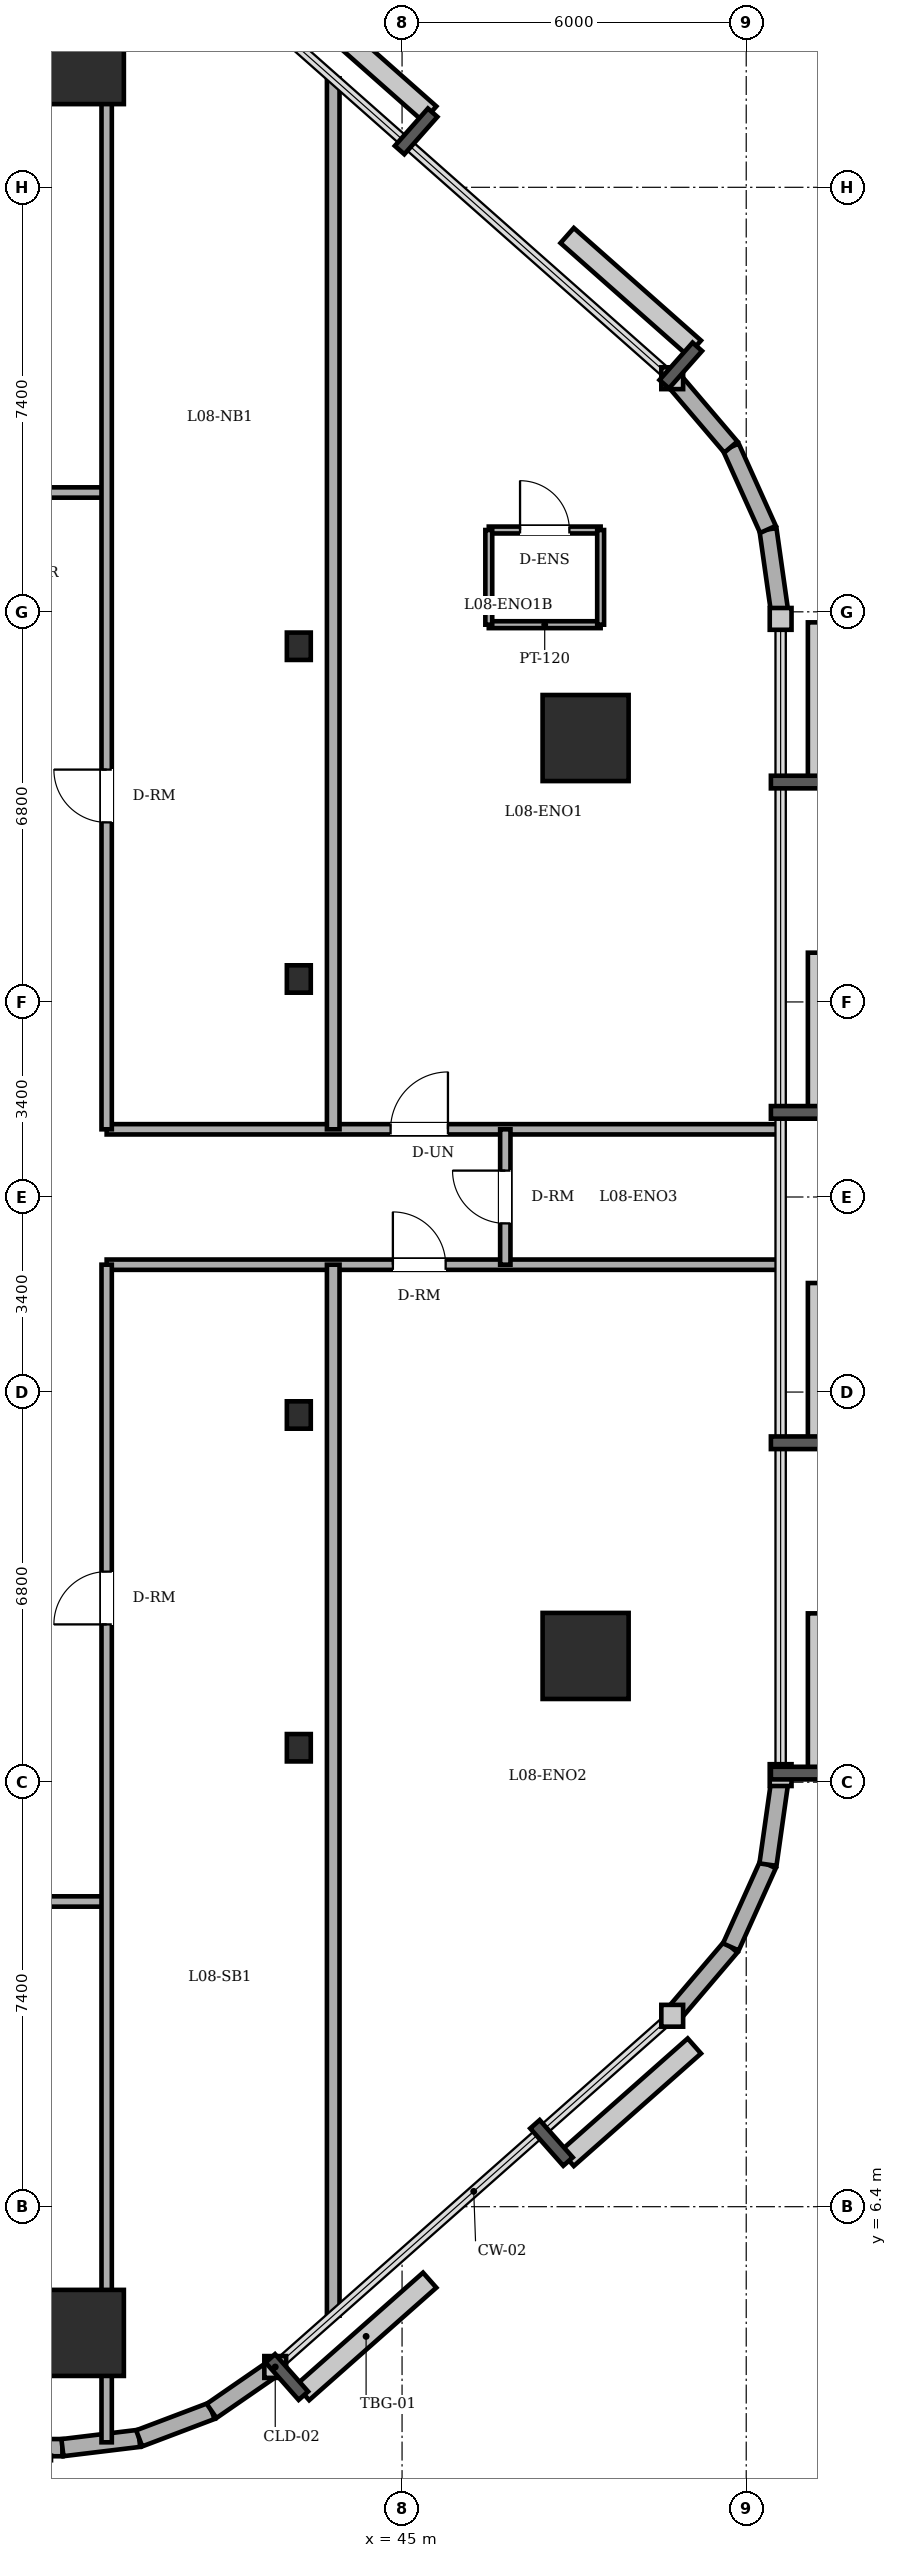
"""IFC4 building model, lengths in metres.
Left out: names, types, materials, properties, quantities, classifications, styles, units other than length and angle.
Written with IfcOpenShell. Run it as: python <this file> out.ifc"""

import sys

from ifc_helpers import new_model, si_unit, direction, frame, frame_2d, origin, origin_2d, place, context, subcontext, project, spatial, rectangle, circle, i_section, extrude, element, fill, save


model = new_model("IFC4")
c1 = context("Model", 3, precision=1e-05, world=origin(), true_north=direction((0.0, 1.0)))
c2 = subcontext(c1, "Body", "Model", "MODEL_VIEW")
j1 = project(units=[si_unit("LENGTHUNIT", "METRE"), si_unit("PLANEANGLEUNIT", "RADIAN")], contexts=[c1])
p1 = place(None, origin())
s1 = spatial("IfcSite", under=j1, at=p1, CompositionType="ELEMENT")
p2 = place(p1, origin())
s2 = spatial("IfcBuilding", under=s1, at=p2, CompositionType="ELEMENT")
p3 = place(p2, frame((0.0, 0.0, 32.4)))
s3 = spatial("IfcBuildingStorey", under=s2, at=p3, CompositionType="ELEMENT", Elevation=32.4)
for number, where, z_axis, x_axis in (
    (1, (39.4, 4.2, 0.0), (0.0, 0.0, 1.0), (1.0, 0.0, 0.0)),
    (2, (48.2, 16.0, 0.0), (0.0, 0.0, 1.0), (1.0, 0.0, 0.0)),
    (3, (48.2, 32.0, 0.0), (0.0, 0.0, 1.0), (1.0, 0.0, 0.0)),
    (4, (39.4, 43.8, 0.0), (0.0, 0.0, 1.0), (1.0, 0.0, 0.0)),
):
    element("IfcColumn", number, at=place(p3, frame(where, z_axis=z_axis, x_axis=x_axis)), inside=s3, PredefinedType="COLUMN", context=c2, shape_type="SweptSolid", body=[
        extrude(circle(Radius=0.75, at=origin_2d()), origin(), (0.0, 0.0, 1.0), 3.6),
    ])
for number, where, z_axis, x_axis in (
    (5, (43.2, 14.4, 0.0), (0.0, 0.0, 1.0), (1.0, 0.0, 0.0)),
    (6, (43.2, 20.2, 0.0), (0.0, 0.0, 1.0), (1.0, 0.0, 0.0)),
    (7, (43.2, 27.8, 0.0), (0.0, 0.0, 1.0), (1.0, 0.0, 0.0)),
    (8, (43.2, 33.6, 0.0), (0.0, 0.0, 1.0), (1.0, 0.0, 0.0)),
):
    element("IfcColumn", number, at=place(p3, frame(where, z_axis=z_axis, x_axis=x_axis)), inside=s3, PredefinedType="COLUMN", context=c2, shape_type="SweptSolid", body=[
        extrude(i_section(OverallWidth=0.417, OverallDepth=0.477, WebThickness=0.036, FlangeThickness=0.057, FilletRadius=0.015, at=origin_2d()), origin(), (0.0, 0.0, 1.0), 3.6),
    ])
p4 = place(p3, frame((9.0, 2.2, 0.0), z_axis=(0.0, 0.0, 1.0), x_axis=(1.0, 0.0, 0.0)))
e9 = element("IfcWall", 9, at=p4, inside=s3, PredefinedType="SOLIDWALL", context=c2, shape_type="SweptSolid", body=[
    extrude(rectangle(XDim=30.079, YDim=0.3, at=frame_2d((15.04, 0.0))), origin(), (0.0, 0.0, 1.0), 3.4),
])
p5 = place(p4, frame((5.412, 0.0, 0.0)))
e10 = element("IfcOpeningElement", 10, at=p5, cuts=e9, PredefinedType="OPENING", context=c2, shape_type="SweptSolid", body=[
    extrude(rectangle(XDim=0.95, YDim=2.2, at=frame_2d((0.475, 1.1))), frame((0.0, 0.16, 0.0), z_axis=(0.0, -1.0, 0.0), x_axis=(1.0, 0.0, 0.0)), (0.0, 0.0, 1.0), 0.32),
])
p6 = place(p4, frame((9.45, 0.0, 0.85)))
e11 = element("IfcOpeningElement", 11, at=p6, cuts=e9, PredefinedType="OPENING", context=c2, shape_type="SweptSolid", body=[
    extrude(rectangle(XDim=1.8, YDim=1.55, at=frame_2d((0.9, 0.775))), frame((0.0, 0.16, 0.0), z_axis=(0.0, -1.0, 0.0), x_axis=(1.0, 0.0, 0.0)), (0.0, 0.0, 1.0), 0.32),
])
p7 = place(p4, frame((15.2, 0.0, 0.85)))
e12 = element("IfcOpeningElement", 12, at=p7, cuts=e9, PredefinedType="OPENING", context=c2, shape_type="SweptSolid", body=[
    extrude(rectangle(XDim=1.8, YDim=1.55, at=frame_2d((0.9, 0.775))), frame((0.0, 0.16, 0.0), z_axis=(0.0, -1.0, 0.0), x_axis=(1.0, 0.0, 0.0)), (0.0, 0.0, 1.0), 0.32),
])
p8 = place(p4, frame((21.01, 0.0, 0.85)))
e13 = element("IfcOpeningElement", 13, at=p8, cuts=e9, PredefinedType="OPENING", context=c2, shape_type="SweptSolid", body=[
    extrude(rectangle(XDim=1.8, YDim=1.55, at=frame_2d((0.9, 0.775))), frame((0.0, 0.16, 0.0), z_axis=(0.0, -1.0, 0.0), x_axis=(1.0, 0.0, 0.0)), (0.0, 0.0, 1.0), 0.32),
])
p9 = place(p4, frame((24.919, 0.0, 0.85)))
e14 = element("IfcOpeningElement", 14, at=p9, cuts=e9, PredefinedType="OPENING", context=c2, shape_type="SweptSolid", body=[
    extrude(rectangle(XDim=1.8, YDim=1.55, at=frame_2d((0.9, 0.775))), frame((0.0, 0.16, 0.0), z_axis=(0.0, -1.0, 0.0), x_axis=(1.0, 0.0, 0.0)), (0.0, 0.0, 1.0), 0.32),
])
p10 = place(p3, frame((39.079, 2.2, 0.0), z_axis=(0.0, 0.0, 1.0), x_axis=(0.992739027259, 0.120288086515, 0.0)))
e15 = element("IfcWall", 15, at=p10, inside=s3, PredefinedType="SOLIDWALL", context=c2, shape_type="SweptSolid", body=[
    extrude(rectangle(XDim=1.348, YDim=0.3, at=frame_2d((0.674, 0.0))), origin(), (0.0, 0.0, 1.0), 3.4),
])
p11 = place(p3, frame((40.417, 2.362, 0.0), z_axis=(0.0, 0.0, 1.0), x_axis=(0.935156721165, 0.354234254216, 0.0)))
e16 = element("IfcWall", 16, at=p11, inside=s3, PredefinedType="SOLIDWALL", context=c2, shape_type="SweptSolid", body=[
    extrude(rectangle(XDim=1.349, YDim=0.3, at=frame_2d((0.675, 0.0))), origin(), (0.0, 0.0, 1.0), 3.4),
])
p12 = place(p3, frame((41.679, 2.84, 0.0), z_axis=(0.0, 0.0, 1.0), x_axis=(0.823116500192, 0.567872544777, 0.0)))
e17 = element("IfcWall", 17, at=p12, inside=s3, PredefinedType="SOLIDWALL", context=c2, shape_type="SweptSolid", body=[
    extrude(rectangle(XDim=1.349, YDim=0.3, at=frame_2d((0.674, 0.0))), origin(), (0.0, 0.0, 1.0), 3.4),
])
p13 = place(p3, frame((49.71, 9.728, 0.0), z_axis=(0.0, 0.0, 1.0), x_axis=(0.648389989909, 0.7613083613, 0.0)))
e18 = element("IfcWall", 18, at=p13, inside=s3, PredefinedType="SOLIDWALL", context=c2, shape_type="SweptSolid", body=[
    extrude(rectangle(XDim=1.576, YDim=0.3, at=frame_2d((0.788, 0.0))), origin(), (0.0, 0.0, 1.0), 3.4),
])
p14 = place(p3, frame((50.732, 10.928, 0.0), z_axis=(0.0, 0.0, 1.0), x_axis=(0.410996558744, 0.911636895206, 0.0)))
e19 = element("IfcWall", 19, at=p14, inside=s3, PredefinedType="SOLIDWALL", context=c2, shape_type="SweptSolid", body=[
    extrude(rectangle(XDim=1.574, YDim=0.3, at=frame_2d((0.787, 0.0))), origin(), (0.0, 0.0, 1.0), 3.4),
])
for number, where, z_axis, x_axis in (
    (20, (51.379, 12.363, 0.0), (0.0, 0.0, 1.0), (0.14, 0.99, 0.0)),
    (21, (51.6, 34.077, 0.0), (0.0, 0.0, 1.0), (-0.14, 0.99, 0.0)),
):
    element("IfcWall", number, at=place(p3, frame(where, z_axis=z_axis, x_axis=x_axis)), inside=s3, PredefinedType="SOLIDWALL", context=c2, shape_type="SweptSolid", body=[
        extrude(rectangle(XDim=1.576, YDim=0.3, at=frame_2d((0.788, 0.0))), origin(), (0.0, 0.0, 1.0), 3.4),
    ])
p15 = place(p3, frame((51.379, 35.637, 0.0), z_axis=(0.0, 0.0, 1.0), x_axis=(-0.410996558744, 0.911636895206, 0.0)))
e22 = element("IfcWall", 22, at=p15, inside=s3, PredefinedType="SOLIDWALL", context=c2, shape_type="SweptSolid", body=[
    extrude(rectangle(XDim=1.574, YDim=0.3, at=frame_2d((0.787, 0.0))), origin(), (0.0, 0.0, 1.0), 3.4),
])
p16 = place(p3, frame((50.732, 37.072, 0.0), z_axis=(0.0, 0.0, 1.0), x_axis=(-0.648389989909, 0.7613083613, 0.0)))
e23 = element("IfcWall", 23, at=p16, inside=s3, PredefinedType="SOLIDWALL", context=c2, shape_type="SweptSolid", body=[
    extrude(rectangle(XDim=1.576, YDim=0.3, at=frame_2d((0.788, 0.0))), origin(), (0.0, 0.0, 1.0), 3.4),
])
p17 = place(p3, frame((46.512, 35.626, 0.0), z_axis=(0.0, 0.0, 1.0), x_axis=(1.0, 0.0, 0.0)))
e24 = element("IfcWall", 24, at=p17, inside=s3, PredefinedType="PARTITIONING", context=c2, shape_type="SweptSolid", body=[
    extrude(rectangle(XDim=1.95, YDim=0.12, at=frame_2d((0.975, 0.0))), origin(), (0.0, 0.0, 1.0), 3.4),
])
p18 = place(p17, frame((0.545, 0.0, 0.0)))
e25 = element("IfcOpeningElement", 25, at=p18, cuts=e24, PredefinedType="OPENING", context=c2, shape_type="SweptSolid", body=[
    extrude(rectangle(XDim=0.86, YDim=2.1, at=frame_2d((0.43, 1.05))), frame((0.0, 0.07, 0.0), z_axis=(0.0, -1.0, 0.0), x_axis=(1.0, 0.0, 0.0)), (0.0, 0.0, 1.0), 0.14),
])
p19 = place(p3, frame((48.462, 33.976, 0.0), z_axis=(0.0, 0.0, 1.0), x_axis=(-1.0, 0.0, 0.0)))
e26 = element("IfcWall", 26, at=p19, inside=s3, PredefinedType="PARTITIONING", context=c2, shape_type="SweptSolid", body=[
    extrude(rectangle(XDim=1.95, YDim=0.12, at=frame_2d((0.975, 0.0))), origin(), (0.0, 0.0, 1.0), 3.4),
])
for number, where, z_axis, x_axis in (
    (27, (46.512, 35.626, 0.0), (0.0, 0.0, 1.0), (0.0, -1.0, 0.0)),
    (28, (48.462, 33.976, 0.0), (0.0, 0.0, 1.0), (0.0, 1.0, 0.0)),
):
    element("IfcWall", number, at=place(p3, frame(where, z_axis=z_axis, x_axis=x_axis)), inside=s3, PredefinedType="PARTITIONING", context=c2, shape_type="SweptSolid", body=[
        extrude(rectangle(XDim=1.65, YDim=0.12, at=frame_2d((0.825, 0.0))), origin(), (0.0, 0.0, 1.0), 3.4),
    ])
p20 = place(p3, frame((3.4, 11.72, 0.0), z_axis=(0.0, 0.0, 1.0), x_axis=(1.0, 0.0, 0.0)))
e29 = element("IfcWall", 29, at=p20, inside=s3, PredefinedType="PARTITIONING", context=c2, shape_type="SweptSolid", body=[
    extrude(rectangle(XDim=36.45, YDim=0.18, at=frame_2d((18.225, 0.0))), origin(), (0.0, 0.0, 1.0), 3.4),
])
p21 = place(p20, frame((21.24, 0.0, 0.0)))
e30 = element("IfcOpeningElement", 30, at=p21, cuts=e29, PredefinedType="OPENING", context=c2, shape_type="SweptSolid", body=[
    extrude(rectangle(XDim=0.92, YDim=2.1, at=frame_2d((0.46, 1.05))), frame((0.0, 0.1, 0.0), z_axis=(0.0, -1.0, 0.0), x_axis=(1.0, 0.0, 0.0)), (0.0, 0.0, 1.0), 0.2),
])
p22 = place(p20, frame((4.925, 0.0, 0.0)))
e31 = element("IfcOpeningElement", 31, at=p22, cuts=e29, PredefinedType="OPENING", context=c2, shape_type="SweptSolid", body=[
    extrude(rectangle(XDim=1.0, YDim=2.15, at=frame_2d((0.5, 1.075))), frame((0.0, 0.1, 0.0), z_axis=(0.0, -1.0, 0.0), x_axis=(1.0, 0.0, 0.0)), (0.0, 0.0, 1.0), 0.2),
])
p23 = place(p20, frame((13.525, 0.0, 0.0)))
e32 = element("IfcOpeningElement", 32, at=p23, cuts=e29, PredefinedType="OPENING", context=c2, shape_type="SweptSolid", body=[
    extrude(rectangle(XDim=1.0, YDim=2.15, at=frame_2d((0.5, 1.075))), frame((0.0, 0.1, 0.0), z_axis=(0.0, -1.0, 0.0), x_axis=(1.0, 0.0, 0.0)), (0.0, 0.0, 1.0), 0.2),
])
p24 = place(p20, frame((29.305, 0.0, 0.0)))
e33 = element("IfcOpeningElement", 33, at=p24, cuts=e29, PredefinedType="OPENING", context=c2, shape_type="SweptSolid", body=[
    extrude(rectangle(XDim=0.92, YDim=2.1, at=frame_2d((0.46, 1.05))), frame((0.0, 0.1, 0.0), z_axis=(0.0, -1.0, 0.0), x_axis=(1.0, 0.0, 0.0)), (0.0, 0.0, 1.0), 0.2),
])
p25 = place(p3, frame((39.85, 22.82, 0.0), z_axis=(0.0, 0.0, 1.0), x_axis=(1.0, 0.0, 0.0)))
e34 = element("IfcWall", 34, at=p25, inside=s3, PredefinedType="PARTITIONING", context=c2, shape_type="SweptSolid", body=[
    extrude(rectangle(XDim=11.75, YDim=0.18, at=frame_2d((5.875, 0.0))), origin(), (0.0, 0.0, 1.0), 3.4),
])
p26 = place(p25, frame((4.99, 0.0, 0.0)))
e35 = element("IfcOpeningElement", 35, at=p26, cuts=e34, PredefinedType="OPENING", context=c2, shape_type="SweptSolid", body=[
    extrude(rectangle(XDim=0.92, YDim=2.1, at=frame_2d((0.46, 1.05))), frame((0.0, 0.1, 0.0), z_axis=(0.0, -1.0, 0.0), x_axis=(1.0, 0.0, 0.0)), (0.0, 0.0, 1.0), 0.2),
])
p27 = place(p3, frame((39.85, 25.18, 0.0), z_axis=(0.0, 0.0, 1.0), x_axis=(1.0, 0.0, 0.0)))
e36 = element("IfcWall", 36, at=p27, inside=s3, PredefinedType="PARTITIONING", context=c2, shape_type="SweptSolid", body=[
    extrude(rectangle(XDim=11.75, YDim=0.18, at=frame_2d((5.875, 0.0))), origin(), (0.0, 0.0, 1.0), 3.4),
])
p28 = place(p27, frame((4.95, 0.0, 0.0)))
e37 = element("IfcOpeningElement", 37, at=p28, cuts=e36, PredefinedType="OPENING", context=c2, shape_type="SweptSolid", body=[
    extrude(rectangle(XDim=1.0, YDim=2.15, at=frame_2d((0.5, 1.075))), frame((0.0, 0.1, 0.0), z_axis=(0.0, -1.0, 0.0), x_axis=(1.0, 0.0, 0.0)), (0.0, 0.0, 1.0), 0.2),
])
p29 = place(p3, frame((3.4, 36.28, 0.0), z_axis=(0.0, 0.0, 1.0), x_axis=(1.0, 0.0, 0.0)))
e38 = element("IfcWall", 38, at=p29, inside=s3, PredefinedType="PARTITIONING", context=c2, shape_type="SweptSolid", body=[
    extrude(rectangle(XDim=36.45, YDim=0.18, at=frame_2d((18.225, 0.0))), origin(), (0.0, 0.0, 1.0), 3.4),
])
p30 = place(p29, frame((21.05, 0.0, 0.0)))
e39 = element("IfcOpeningElement", 39, at=p30, cuts=e38, PredefinedType="OPENING", context=c2, shape_type="SweptSolid", body=[
    extrude(rectangle(XDim=0.9, YDim=2.1, at=frame_2d((0.45, 1.05))), frame((0.0, 0.1, 0.0), z_axis=(0.0, -1.0, 0.0), x_axis=(1.0, 0.0, 0.0)), (0.0, 0.0, 1.0), 0.2),
])
p31 = place(p29, frame((24.67, 0.0, 0.0)))
e40 = element("IfcOpeningElement", 40, at=p31, cuts=e38, PredefinedType="OPENING", context=c2, shape_type="SweptSolid", body=[
    extrude(rectangle(XDim=0.86, YDim=2.1, at=frame_2d((0.43, 1.05))), frame((0.0, 0.1, 0.0), z_axis=(0.0, -1.0, 0.0), x_axis=(1.0, 0.0, 0.0)), (0.0, 0.0, 1.0), 0.2),
])
p32 = place(p29, frame((4.659, 0.0, 0.0)))
e41 = element("IfcOpeningElement", 41, at=p32, cuts=e38, PredefinedType="OPENING", context=c2, shape_type="SweptSolid", body=[
    extrude(rectangle(XDim=1.0, YDim=2.15, at=frame_2d((0.5, 1.075))), frame((0.0, 0.1, 0.0), z_axis=(0.0, -1.0, 0.0), x_axis=(1.0, 0.0, 0.0)), (0.0, 0.0, 1.0), 0.2),
])
p33 = place(p29, frame((13.258, 0.0, 0.0)))
e42 = element("IfcOpeningElement", 42, at=p33, cuts=e38, PredefinedType="OPENING", context=c2, shape_type="SweptSolid", body=[
    extrude(rectangle(XDim=1.0, YDim=2.15, at=frame_2d((0.5, 1.075))), frame((0.0, 0.1, 0.0), z_axis=(0.0, -1.0, 0.0), x_axis=(1.0, 0.0, 0.0)), (0.0, 0.0, 1.0), 0.2),
])
p34 = place(p29, frame((30.965, 0.0, 0.0)))
e43 = element("IfcOpeningElement", 43, at=p34, cuts=e38, PredefinedType="OPENING", context=c2, shape_type="SweptSolid", body=[
    extrude(rectangle(XDim=1.0, YDim=2.15, at=frame_2d((0.5, 1.075))), frame((0.0, 0.1, 0.0), z_axis=(0.0, -1.0, 0.0), x_axis=(1.0, 0.0, 0.0)), (0.0, 0.0, 1.0), 0.2),
])
p35 = place(p3, frame((39.85, 2.293, 0.0), z_axis=(0.0, 0.0, 1.0), x_axis=(0.0, 1.0, 0.0)))
e44 = element("IfcWall", 44, at=p35, inside=s3, PredefinedType="PARTITIONING", context=c2, shape_type="SweptSolid", body=[
    extrude(rectangle(XDim=20.527, YDim=0.18, at=frame_2d((10.264, 0.0))), origin(), (0.0, 0.0, 1.0), 2.782),
])
p36 = place(p35, frame((14.257, 0.0, 0.0)))
e45 = element("IfcOpeningElement", 45, at=p36, cuts=e44, PredefinedType="OPENING", context=c2, shape_type="SweptSolid", body=[
    extrude(rectangle(XDim=0.92, YDim=2.1, at=frame_2d((0.46, 1.05))), frame((0.0, 0.1, 0.0), z_axis=(0.0, -1.0, 0.0), x_axis=(1.0, 0.0, 0.0)), (0.0, 0.0, 1.0), 0.2),
])
p37 = place(p3, frame((39.85, 25.18, 0.0), z_axis=(0.0, 0.0, 1.0), x_axis=(0.0, 1.0, 0.0)))
e46 = element("IfcWall", 46, at=p37, inside=s3, PredefinedType="PARTITIONING", context=c2, shape_type="SweptSolid", body=[
    extrude(rectangle(XDim=20.527, YDim=0.18, at=frame_2d((10.264, 0.0))), origin(), (0.0, 0.0, 1.0), 2.782),
])
p38 = place(p37, frame((5.35, 0.0, 0.0)))
e47 = element("IfcOpeningElement", 47, at=p38, cuts=e46, PredefinedType="OPENING", context=c2, shape_type="SweptSolid", body=[
    extrude(rectangle(XDim=0.92, YDim=2.1, at=frame_2d((0.46, 1.05))), frame((0.0, 0.1, 0.0), z_axis=(0.0, -1.0, 0.0), x_axis=(1.0, 0.0, 0.0)), (0.0, 0.0, 1.0), 0.2),
])
for number, where, z_axis, x_axis in (
    (48, (43.8, 4.5, 0.0), (0.0, 0.0, 1.0), (0.0, 1.0, 0.0)),
    (49, (43.8, 25.18, 0.0), (0.0, 0.0, 1.0), (0.0, 1.0, 0.0)),
):
    element("IfcWall", number, at=place(p3, frame(where, z_axis=z_axis, x_axis=x_axis)), inside=s3, PredefinedType="PARTITIONING", context=c2, shape_type="SweptSolid", body=[
        extrude(rectangle(XDim=18.32, YDim=0.22, at=frame_2d((9.16, 0.0))), origin(), (0.0, 0.0, 1.0), 3.4),
    ])
p39 = place(p3, frame((46.8, 22.82, 0.0), z_axis=(0.0, 0.0, 1.0), x_axis=(0.0, 1.0, 0.0)))
e50 = element("IfcWall", 50, at=p39, inside=s3, PredefinedType="PARTITIONING", context=c2, shape_type="SweptSolid", body=[
    extrude(rectangle(XDim=2.36, YDim=0.18, at=frame_2d((1.18, 0.0))), origin(), (0.0, 0.0, 1.0), 3.4),
])
p40 = place(p39, frame((0.72, 0.0, 0.0)))
e51 = element("IfcOpeningElement", 51, at=p40, cuts=e50, PredefinedType="OPENING", context=c2, shape_type="SweptSolid", body=[
    extrude(rectangle(XDim=0.92, YDim=2.1, at=frame_2d((0.46, 1.05))), frame((0.0, 0.1, 0.0), z_axis=(0.0, -1.0, 0.0), x_axis=(1.0, 0.0, 0.0)), (0.0, 0.0, 1.0), 0.2),
])
p41 = place(p18, origin())
e52 = element("IfcDoor", 52, at=p41, inside=s3, OperationType="SINGLE_SWING_LEFT", PredefinedType="DOOR", context=c2, shape_type="SweptSolid", body=[
    extrude(rectangle(XDim=0.86, YDim=2.1, at=frame_2d((0.43, 1.05))), frame((0.0, 0.025, 0.0), z_axis=(0.0, -1.0, 0.0), x_axis=(1.0, 0.0, 0.0)), (0.0, 0.0, 1.0), 0.05),
])
fill(e25, e52)
p42 = place(p38, origin())
e53 = element("IfcDoor", 53, at=p42, inside=s3, OperationType="SINGLE_SWING_RIGHT", PredefinedType="DOOR", context=c2, shape_type="SweptSolid", body=[
    extrude(rectangle(XDim=0.92, YDim=2.1, at=frame_2d((0.46, 1.05))), frame((0.0, 0.025, 0.0), z_axis=(0.0, -1.0, 0.0), x_axis=(1.0, 0.0, 0.0)), (0.0, 0.0, 1.0), 0.05),
])
fill(e47, e53)
p43 = place(p36, origin())
e54 = element("IfcDoor", 54, at=p43, inside=s3, OperationType="SINGLE_SWING_LEFT", PredefinedType="DOOR", context=c2, shape_type="SweptSolid", body=[
    extrude(rectangle(XDim=0.92, YDim=2.1, at=frame_2d((0.46, 1.05))), frame((0.0, 0.025, 0.0), z_axis=(0.0, -1.0, 0.0), x_axis=(1.0, 0.0, 0.0)), (0.0, 0.0, 1.0), 0.05),
])
fill(e45, e54)
p44 = place(p28, origin())
e55 = element("IfcDoor", 55, at=p44, inside=s3, OperationType="SINGLE_SWING_RIGHT", PredefinedType="DOOR", context=c2, shape_type="SweptSolid", body=[
    extrude(rectangle(XDim=1.0, YDim=2.15, at=frame_2d((0.5, 1.075))), frame((0.0, 0.025, 0.0), z_axis=(0.0, -1.0, 0.0), x_axis=(1.0, 0.0, 0.0)), (0.0, 0.0, 1.0), 0.05),
])
fill(e37, e55)
p45 = place(p26, origin())
e56 = element("IfcDoor", 56, at=p45, inside=s3, OperationType="SINGLE_SWING_LEFT", PredefinedType="DOOR", context=c2, shape_type="SweptSolid", body=[
    extrude(rectangle(XDim=0.92, YDim=2.1, at=frame_2d((0.46, 1.05))), frame((0.0, 0.025, 0.0), z_axis=(0.0, -1.0, 0.0), x_axis=(1.0, 0.0, 0.0)), (0.0, 0.0, 1.0), 0.05),
])
fill(e35, e56)
p46 = place(p40, origin())
e57 = element("IfcDoor", 57, at=p46, inside=s3, OperationType="SINGLE_SWING_RIGHT", PredefinedType="DOOR", context=c2, shape_type="SweptSolid", body=[
    extrude(rectangle(XDim=0.92, YDim=2.1, at=frame_2d((0.46, 1.05))), frame((0.0, 0.025, 0.0), z_axis=(0.0, -1.0, 0.0), x_axis=(1.0, 0.0, 0.0)), (0.0, 0.0, 1.0), 0.05),
])
fill(e51, e57)
save(model, sys.argv[1])
